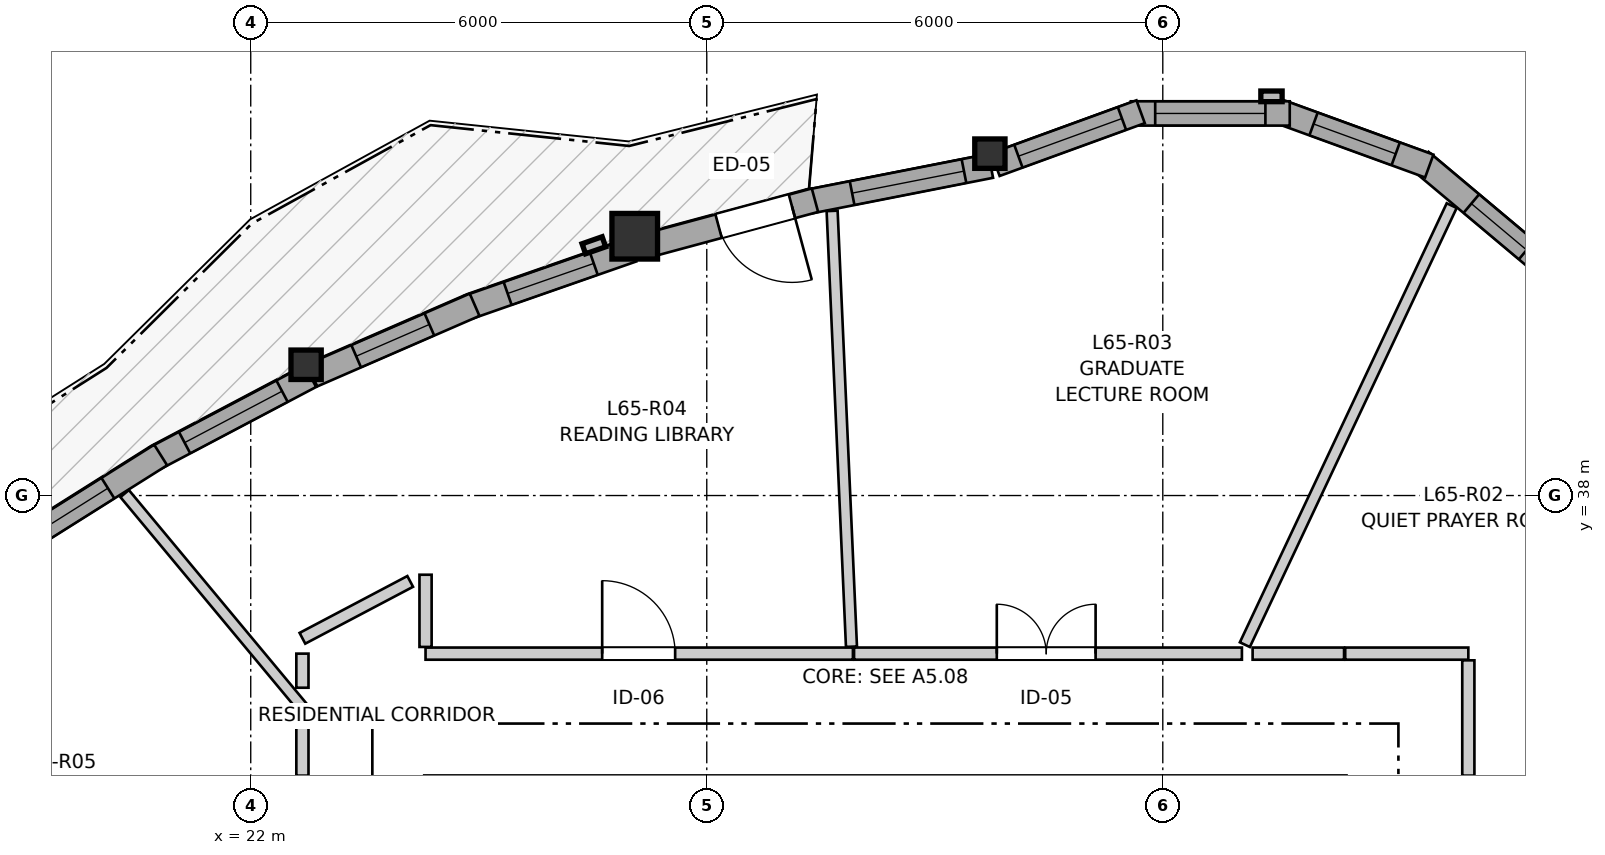
"""IFC4 building model, lengths in metres.
Left out: names, types, materials, properties, quantities, classifications, styles, units other than length and angle.
Written with IfcOpenShell. Run it as: python <this file> out.ifc"""

import sys

from ifc_helpers import new_model, si_unit, direction, frame, frame_2d, origin, origin_2d, place, context, subcontext, project, spatial, rectangle, i_section, extrude, source, transform, mapped, element, fill, save


model = new_model("IFC4")
c1 = context("Model", 3, precision=1e-05, world=origin(), true_north=direction((0.0, 1.0)))
c2 = subcontext(c1, "Body", "Model", "MODEL_VIEW")
j1 = project(units=[si_unit("LENGTHUNIT", "METRE"), si_unit("PLANEANGLEUNIT", "RADIAN")], contexts=[c1])
p1 = place(None, origin())
s1 = spatial("IfcSite", under=j1, at=p1, CompositionType="ELEMENT")
p2 = place(p1, origin())
s2 = spatial("IfcBuilding", under=s1, at=p2, CompositionType="ELEMENT")
p3 = place(p2, frame((0.0, 0.0, 218.0)))
s3 = spatial("IfcBuildingStorey", under=s2, at=p3, CompositionType="ELEMENT", Elevation=218.0)
m1 = source(origin(), c2, "Body", "SweptSolid", [
    extrude(i_section(OverallWidth=0.398, OverallDepth=0.387, WebThickness=0.019, FlangeThickness=0.03, FilletRadius=0.015, at=origin_2d()), origin(), (0.0, 0.0, 1.0), 2.96),
])
p4 = place(p3, frame((31.725, 42.498, 0.0), z_axis=(0.0, 0.0, 1.0), x_axis=(1.0, 0.0, 0.0)))
e1 = element("IfcColumn", 1, at=p4, inside=s3, PredefinedType="PILASTER", context=c2, shape_type="MappedRepresentation", body=[
    mapped(m1, transform((0.0, 0.0, 0.0), x_axis=(1.0, 0.0, 0.0), y_axis=(0.0, 1.0, 0.0), z_axis=(0.0, 0.0, 1.0), scale=1.0)),
])
m2 = source(origin(), c2, "Body", "SweptSolid", [
    extrude(rectangle(XDim=0.6, YDim=0.6, at=origin_2d()), origin(), (0.0, 0.0, 1.0), 2.96),
])
p5 = place(p3, frame((27.052, 41.411, 0.0), z_axis=(0.0, 0.0, 1.0), x_axis=(1.0, 0.0, 0.0)))
e2 = element("IfcColumn", 2, at=p5, inside=s3, PredefinedType="COLUMN", context=c2, shape_type="MappedRepresentation", body=[
    mapped(m2, transform((0.0, 0.0, 0.0), x_axis=(1.0, 0.0, 0.0), y_axis=(0.0, 1.0, 0.0), z_axis=(0.0, 0.0, 1.0), scale=1.0)),
])
p6 = place(p3, frame((22.729, 39.72, 0.0), z_axis=(0.0, 0.0, 1.0), x_axis=(1.0, 0.0, 0.0)))
e3 = element("IfcColumn", 3, at=p6, inside=s3, PredefinedType="PILASTER", context=c2, shape_type="MappedRepresentation", body=[
    mapped(m1, transform((0.0, 0.0, 0.0), x_axis=(1.0, 0.0, 0.0), y_axis=(0.0, 1.0, 0.0), z_axis=(0.0, 0.0, 1.0), scale=1.0)),
])
p7 = place(p3, frame((38.994, 41.056, 0.0), z_axis=(0.0, 0.0, 1.0), x_axis=(-0.766024572719, 0.642811289563, 0.0)))
e4 = element("IfcWall", 4, at=p7, inside=s3, PredefinedType="SOLIDWALL", context=c2, shape_type="SweptSolid", body=[
    extrude(rectangle(XDim=2.09, YDim=0.32, at=frame_2d((1.045, 0.0))), origin(), (0.0, 0.0, 1.0), 2.58),
])
p8 = place(p7, frame((0.271, 0.0, 0.82)))
e5 = element("IfcOpeningElement", 5, at=p8, cuts=e4, PredefinedType="OPENING", context=c2, shape_type="SweptSolid", body=[
    extrude(rectangle(XDim=0.95, YDim=1.35, at=frame_2d((0.475, 0.675))), frame((0.0, 0.17, 0.0), z_axis=(0.0, -1.0, 0.0), x_axis=(1.0, 0.0, 0.0)), (0.0, 0.0, 1.0), 0.34),
])
p9 = place(p3, frame((37.506, 42.334, 0.0), z_axis=(0.0, 0.0, 1.0), x_axis=(-0.939711556618, 0.341968113072, 0.0)))
e6 = element("IfcWall", 6, at=p9, inside=s3, PredefinedType="SOLIDWALL", context=c2, shape_type="SweptSolid", body=[
    extrude(rectangle(XDim=2.09, YDim=0.32, at=frame_2d((1.045, 0.0))), origin(), (0.0, 0.0, 1.0), 2.58),
])
p10 = place(p9, frame((0.47, 0.0, 0.82)))
e7 = element("IfcOpeningElement", 7, at=p10, cuts=e6, PredefinedType="OPENING", context=c2, shape_type="SweptSolid", body=[
    extrude(rectangle(XDim=1.15, YDim=1.2, at=frame_2d((0.575, 0.6))), frame((0.0, 0.17, 0.0), z_axis=(0.0, -1.0, 0.0), x_axis=(1.0, 0.0, 0.0)), (0.0, 0.0, 1.0), 0.34),
])
p11 = place(p3, frame((35.67, 43.027, 0.0), z_axis=(0.0, 0.0, 1.0), x_axis=(-1.0, 0.0, 0.0)))
e8 = element("IfcWall", 8, at=p11, inside=s3, PredefinedType="SOLIDWALL", context=c2, shape_type="SweptSolid", body=[
    extrude(rectangle(XDim=2.09, YDim=0.32, at=frame_2d((1.045, 0.0))), origin(), (0.0, 0.0, 1.0), 2.58),
])
p12 = place(p11, frame((0.32, 0.0, 0.82)))
e9 = element("IfcOpeningElement", 9, at=p12, cuts=e8, PredefinedType="OPENING", context=c2, shape_type="SweptSolid", body=[
    extrude(rectangle(XDim=1.45, YDim=1.25, at=frame_2d((0.725, 0.625))), frame((0.0, 0.17, 0.0), z_axis=(0.0, -1.0, 0.0), x_axis=(1.0, 0.0, 0.0)), (0.0, 0.0, 1.0), 0.34),
])
p13 = place(p3, frame((33.708, 43.049, 0.0), z_axis=(0.0, 0.0, 1.0), x_axis=(-0.939691662178, -0.342022777067, 0.0)))
e10 = element("IfcWall", 10, at=p13, inside=s3, PredefinedType="SOLIDWALL", context=c2, shape_type="SweptSolid", body=[
    extrude(rectangle(XDim=2.032, YDim=0.32, at=frame_2d((1.016, 0.0))), origin(), (0.0, 0.0, 1.0), 2.58),
])
p14 = place(p13, frame((0.261, 0.0, 0.82)))
e11 = element("IfcOpeningElement", 11, at=p14, cuts=e10, PredefinedType="OPENING", context=c2, shape_type="SweptSolid", body=[
    extrude(rectangle(XDim=1.45, YDim=1.25, at=frame_2d((0.725, 0.625))), frame((0.0, 0.17, 0.0), z_axis=(0.0, -1.0, 0.0), x_axis=(1.0, 0.0, 0.0)), (0.0, 0.0, 1.0), 0.34),
])
p15 = place(p3, frame((31.736, 42.337, 0.0), z_axis=(0.0, 0.0, 1.0), x_axis=(-0.981228566979, -0.192848384345, 0.0)))
e12 = element("IfcWall", 12, at=p15, inside=s3, PredefinedType="SOLIDWALL", context=c2, shape_type="SweptSolid", body=[
    extrude(rectangle(XDim=2.443, YDim=0.32, at=frame_2d((1.222, 0.0))), origin(), (0.0, 0.0, 1.0), 2.58),
])
p16 = place(p15, frame((0.359, 0.0, 0.82)))
e13 = element("IfcOpeningElement", 13, at=p16, cuts=e12, PredefinedType="OPENING", context=c2, shape_type="SweptSolid", body=[
    extrude(rectangle(XDim=1.5, YDim=1.45, at=frame_2d((0.75, 0.725))), frame((0.0, 0.17, 0.0), z_axis=(0.0, -1.0, 0.0), x_axis=(1.0, 0.0, 0.0)), (0.0, 0.0, 1.0), 0.34),
])
p17 = place(p3, frame((29.424, 41.885, 0.0), z_axis=(0.0, 0.0, 1.0), x_axis=(-0.965461343217, -0.260546338976, 0.0)))
e14 = element("IfcWall", 14, at=p17, inside=s3, PredefinedType="SOLIDWALL", context=c2, shape_type="SweptSolid", body=[
    extrude(rectangle(XDim=2.323, YDim=0.32, at=frame_2d((1.162, 0.0))), origin(), (0.0, 0.0, 1.0), 2.58),
])
p18 = place(p17, frame((0.313, 0.0, 0.0)))
e15 = element("IfcOpeningElement", 15, at=p18, cuts=e14, PredefinedType="OPENING", context=c2, shape_type="SweptSolid", body=[
    extrude(rectangle(XDim=1.0, YDim=2.1, at=frame_2d((0.5, 1.05))), frame((0.0, 0.17, 0.0), z_axis=(0.0, -1.0, 0.0), x_axis=(1.0, 0.0, 0.0)), (0.0, 0.0, 1.0), 0.34),
])
p19 = place(p3, frame((27.02, 41.23, 0.0), z_axis=(0.0, 0.0, 1.0), x_axis=(-0.944142960918, -0.329536142705, 0.0)))
e16 = element("IfcWall", 16, at=p19, inside=s3, PredefinedType="SOLIDWALL", context=c2, shape_type="SweptSolid", body=[
    extrude(rectangle(XDim=2.284, YDim=0.32, at=frame_2d((1.142, 0.0))), origin(), (0.0, 0.0, 1.0), 2.58),
])
p20 = place(p19, frame((0.537, 0.0, 0.82)))
e17 = element("IfcOpeningElement", 17, at=p20, cuts=e16, PredefinedType="OPENING", context=c2, shape_type="SweptSolid", body=[
    extrude(rectangle(XDim=1.2, YDim=1.45, at=frame_2d((0.6, 0.725))), frame((0.0, 0.17, 0.0), z_axis=(0.0, -1.0, 0.0), x_axis=(1.0, 0.0, 0.0)), (0.0, 0.0, 1.0), 0.34),
])
p21 = place(p3, frame((24.945, 40.51, 0.0), z_axis=(0.0, 0.0, 1.0), x_axis=(-0.917060051629, -0.39874912126, 0.0)))
e18 = element("IfcWall", 18, at=p21, inside=s3, PredefinedType="SOLIDWALL", context=c2, shape_type="SweptSolid", body=[
    extrude(rectangle(XDim=2.328, YDim=0.32, at=frame_2d((1.164, 0.0))), origin(), (0.0, 0.0, 1.0), 2.58),
])
p22 = place(p21, frame((0.649, 0.0, 0.82)))
e19 = element("IfcOpeningElement", 19, at=p22, cuts=e18, PredefinedType="OPENING", context=c2, shape_type="SweptSolid", body=[
    extrude(rectangle(XDim=1.05, YDim=1.45, at=frame_2d((0.525, 0.725))), frame((0.0, 0.17, 0.0), z_axis=(0.0, -1.0, 0.0), x_axis=(1.0, 0.0, 0.0)), (0.0, 0.0, 1.0), 0.34),
])
p23 = place(p3, frame((22.785, 39.57, 0.0), z_axis=(0.0, 0.0, 1.0), x_axis=(-0.884379914657, -0.466767786541, 0.0)))
e20 = element("IfcWall", 20, at=p23, inside=s3, PredefinedType="SOLIDWALL", context=c2, shape_type="SweptSolid", body=[
    extrude(rectangle(XDim=2.314, YDim=0.32, at=frame_2d((1.157, 0.0))), origin(), (0.0, 0.0, 1.0), 2.58),
])
p24 = place(p23, frame((0.422, 0.0, 0.82)))
e21 = element("IfcOpeningElement", 21, at=p24, cuts=e20, PredefinedType="OPENING", context=c2, shape_type="SweptSolid", body=[
    extrude(rectangle(XDim=1.45, YDim=1.25, at=frame_2d((0.725, 0.625))), frame((0.0, 0.17, 0.0), z_axis=(0.0, -1.0, 0.0), x_axis=(1.0, 0.0, 0.0)), (0.0, 0.0, 1.0), 0.34),
])
p25 = place(p3, frame((20.815, 38.533, 0.0), z_axis=(0.0, 0.0, 1.0), x_axis=(-0.846418054627, -0.532518991963, 0.0)))
e22 = element("IfcWall", 22, at=p25, inside=s3, PredefinedType="SOLIDWALL", context=c2, shape_type="SweptSolid", body=[
    extrude(rectangle(XDim=2.245, YDim=0.32, at=frame_2d((1.122, 0.0))), origin(), (0.0, 0.0, 1.0), 2.58),
])
p26 = place(p25, frame((0.82, 0.0, 0.82)))
e23 = element("IfcOpeningElement", 23, at=p26, cuts=e22, PredefinedType="OPENING", context=c2, shape_type="SweptSolid", body=[
    extrude(rectangle(XDim=1.05, YDim=1.45, at=frame_2d((0.525, 0.725))), frame((0.0, 0.17, 0.0), z_axis=(0.0, -1.0, 0.0), x_axis=(1.0, 0.0, 0.0)), (0.0, 0.0, 1.0), 0.34),
])
p27 = place(p3, frame((24.3, 35.92, 0.0), z_axis=(0.0, 0.0, 1.0), x_axis=(1.0, 0.0, 0.0)))
e24 = element("IfcWall", 24, at=p27, inside=s3, PredefinedType="PARTITIONING", context=c2, shape_type="SweptSolid", body=[
    extrude(rectangle(XDim=5.623, YDim=0.16, at=frame_2d((2.812, 0.0))), origin(), (0.0, 0.0, 1.0), 2.96),
])
p28 = place(p27, frame((2.324, 0.0, 0.0)))
e25 = element("IfcOpeningElement", 25, at=p28, cuts=e24, PredefinedType="OPENING", context=c2, shape_type="SweptSolid", body=[
    extrude(rectangle(XDim=0.96, YDim=2.1, at=frame_2d((0.48, 1.05))), frame((0.0, 0.09, 0.0), z_axis=(0.0, -1.0, 0.0), x_axis=(1.0, 0.0, 0.0)), (0.0, 0.0, 1.0), 0.18),
])
p29 = place(p3, frame((29.938, 35.92, 0.0), z_axis=(0.0, 0.0, 1.0), x_axis=(1.0, 0.0, 0.0)))
e26 = element("IfcWall", 26, at=p29, inside=s3, PredefinedType="PARTITIONING", context=c2, shape_type="SweptSolid", body=[
    extrude(rectangle(XDim=5.103, YDim=0.16, at=frame_2d((2.552, 0.0))), origin(), (0.0, 0.0, 1.0), 2.628),
])
p30 = place(p29, frame((1.878, 0.0, 0.0)))
e27 = element("IfcOpeningElement", 27, at=p30, cuts=e26, PredefinedType="OPENING", context=c2, shape_type="SweptSolid", body=[
    extrude(rectangle(XDim=1.3, YDim=2.1, at=frame_2d((0.65, 1.05))), frame((0.0, 0.09, 0.0), z_axis=(0.0, -1.0, 0.0), x_axis=(1.0, 0.0, 0.0)), (0.0, 0.0, 1.0), 0.18),
])
p31 = place(p3, frame((35.08, 36.038, 0.0), z_axis=(0.0, 0.0, 1.0), x_axis=(0.426214985607, 0.904621902258, 0.0)))
e28 = element("IfcWall", 28, at=p31, inside=s3, PredefinedType="PARTITIONING", context=c2, shape_type="SweptSolid", body=[
    extrude(rectangle(XDim=6.385, YDim=0.145, at=frame_2d((3.192, 0.0))), origin(), (0.0, 0.0, 1.0), 2.96),
])
p32 = place(p3, frame((29.649, 41.745, 0.0), z_axis=(0.0, 0.0, 1.0), x_axis=(0.044327022296, -0.999017074476, 0.0)))
e29 = element("IfcWall", 29, at=p32, inside=s3, PredefinedType="PARTITIONING", context=c2, shape_type="SweptSolid", body=[
    extrude(rectangle(XDim=5.739, YDim=0.145, at=frame_2d((2.87, 0.0))), origin(), (0.0, 0.0, 1.0), 2.96),
])
p33 = place(p3, frame((20.341, 38.025, 0.0), z_axis=(0.0, 0.0, 1.0), x_axis=(0.639731122463, -0.768598784121, 0.0)))
e30 = element("IfcWall", 30, at=p33, inside=s3, PredefinedType="PARTITIONING", context=c2, shape_type="SweptSolid", body=[
    extrude(rectangle(XDim=3.656, YDim=0.145, at=frame_2d((1.828, 0.0))), origin(), (0.0, 0.0, 1.0), 2.96),
])
p34 = place(p3, frame((36.4, 35.92, 0.0), z_axis=(0.0, 0.0, 1.0), x_axis=(1.0, 0.0, 0.0)))
e31 = element("IfcWall", 31, at=p34, inside=s3, PredefinedType="PARTITIONING", context=c2, shape_type="SweptSolid", body=[
    extrude(rectangle(XDim=1.62, YDim=0.16, at=frame_2d((0.81, 0.0))), origin(), (0.0, 0.0, 1.0), 2.96),
])
p35 = place(p3, frame((38.02, 34.315, 0.0), z_axis=(0.0, 0.0, 1.0), x_axis=(0.0, 1.0, 0.0)))
e32 = element("IfcWall", 32, at=p35, inside=s3, PredefinedType="PARTITIONING", context=c2, shape_type="SweptSolid", body=[
    extrude(rectangle(XDim=1.517, YDim=0.16, at=frame_2d((0.759, 0.0))), origin(), (0.0, 0.0, 1.0), 2.628),
])
p36 = place(p3, frame((22.68, 36.122, 0.0), z_axis=(0.0, 0.0, 1.0), x_axis=(0.884468554818, 0.466599802335, 0.0)))
e33 = element("IfcWall", 33, at=p36, inside=s3, PredefinedType="PARTITIONING", context=c2, shape_type="SweptSolid", body=[
    extrude(rectangle(XDim=1.603, YDim=0.16, at=frame_2d((0.802, 0.0))), origin(), (0.0, 0.0, 1.0), 2.96),
])
p37 = place(p3, frame((35.182, 35.92, 0.0), z_axis=(0.0, 0.0, 1.0), x_axis=(1.0, 0.0, 0.0)))
e34 = element("IfcWall", 34, at=p37, inside=s3, PredefinedType="PARTITIONING", context=c2, shape_type="SweptSolid", body=[
    extrude(rectangle(XDim=1.203, YDim=0.16, at=frame_2d((0.602, 0.0))), origin(), (0.0, 0.0, 1.0), 2.96),
])
p38 = place(p3, frame((24.3, 36.008, 0.0), z_axis=(0.0, 0.0, 1.0), x_axis=(0.0, 1.0, 0.0)))
e35 = element("IfcWall", 35, at=p38, inside=s3, PredefinedType="PARTITIONING", context=c2, shape_type="SweptSolid", body=[
    extrude(rectangle(XDim=0.95, YDim=0.16, at=frame_2d((0.475, 0.0))), origin(), (0.0, 0.0, 1.0), 2.96),
])
p39 = place(p3, frame((22.68, 34.315, 0.0), z_axis=(0.0, 0.0, 1.0), x_axis=(0.0, 1.0, 0.0)))
e36 = element("IfcWall", 36, at=p39, inside=s3, PredefinedType="PARTITIONING", context=c2, shape_type="SweptSolid", body=[
    extrude(rectangle(XDim=0.707, YDim=0.16, at=frame_2d((0.353, 0.0))), origin(), (0.0, 0.0, 1.0), 2.96),
])
p40 = place(p3, frame((22.68, 35.471, 0.0), z_axis=(0.0, 0.0, 1.0), x_axis=(0.0, 1.0, 0.0)))
e37 = element("IfcWall", 37, at=p40, inside=s3, PredefinedType="PARTITIONING", context=c2, shape_type="SweptSolid", body=[
    extrude(rectangle(XDim=0.448, YDim=0.16, at=frame_2d((0.224, 0.0))), origin(), (0.0, 0.0, 1.0), 2.96),
])
m3 = source(origin(), c2, "Body", "SweptSolid", [
    extrude(rectangle(XDim=0.95, YDim=1.35, at=frame_2d((0.475, 0.675))), frame((0.0, 0.03, 0.0), z_axis=(0.0, -1.0, 0.0), x_axis=(1.0, 0.0, 0.0)), (0.0, 0.0, 1.0), 0.06),
])
p41 = place(p8, origin())
e38 = element("IfcWindow", 38, at=p41, inside=s3, PartitioningType="SINGLE_PANEL", PredefinedType="WINDOW", context=c2, shape_type="MappedRepresentation", body=[
    mapped(m3, transform((0.0, 0.0, 0.0), x_axis=(1.0, 0.0, 0.0), y_axis=(0.0, 1.0, 0.0), z_axis=(0.0, 0.0, 1.0), scale=1.0)),
])
fill(e5, e38)
m4 = source(origin(), c2, "Body", "SweptSolid", [
    extrude(rectangle(XDim=1.15, YDim=1.2, at=frame_2d((0.575, 0.6))), frame((0.0, 0.03, 0.0), z_axis=(0.0, -1.0, 0.0), x_axis=(1.0, 0.0, 0.0)), (0.0, 0.0, 1.0), 0.06),
])
p42 = place(p10, origin())
e39 = element("IfcWindow", 39, at=p42, inside=s3, PartitioningType="SINGLE_PANEL", PredefinedType="WINDOW", context=c2, shape_type="MappedRepresentation", body=[
    mapped(m4, transform((0.0, 0.0, 0.0), x_axis=(1.0, 0.0, 0.0), y_axis=(0.0, 1.0, 0.0), z_axis=(0.0, 0.0, 1.0), scale=1.0)),
])
fill(e7, e39)
m5 = source(origin(), c2, "Body", "SweptSolid", [
    extrude(rectangle(XDim=1.45, YDim=1.25, at=frame_2d((0.725, 0.625))), frame((0.0, 0.03, 0.0), z_axis=(0.0, -1.0, 0.0), x_axis=(1.0, 0.0, 0.0)), (0.0, 0.0, 1.0), 0.06),
])
p43 = place(p12, origin())
e40 = element("IfcWindow", 40, at=p43, inside=s3, PartitioningType="SINGLE_PANEL", PredefinedType="WINDOW", context=c2, shape_type="MappedRepresentation", body=[
    mapped(m5, transform((0.0, 0.0, 0.0), x_axis=(1.0, 0.0, 0.0), y_axis=(0.0, 1.0, 0.0), z_axis=(0.0, 0.0, 1.0), scale=1.0)),
])
fill(e9, e40)
p44 = place(p14, origin())
e41 = element("IfcWindow", 41, at=p44, inside=s3, PartitioningType="SINGLE_PANEL", PredefinedType="WINDOW", context=c2, shape_type="MappedRepresentation", body=[
    mapped(m5, transform((0.0, 0.0, 0.0), x_axis=(1.0, 0.0, 0.0), y_axis=(0.0, 1.0, 0.0), z_axis=(0.0, 0.0, 1.0), scale=1.0)),
])
fill(e11, e41)
m6 = source(origin(), c2, "Body", "SweptSolid", [
    extrude(rectangle(XDim=1.5, YDim=1.45, at=frame_2d((0.75, 0.725))), frame((0.0, 0.03, 0.0), z_axis=(0.0, -1.0, 0.0), x_axis=(1.0, 0.0, 0.0)), (0.0, 0.0, 1.0), 0.06),
])
p45 = place(p16, origin())
e42 = element("IfcWindow", 42, at=p45, inside=s3, PartitioningType="SINGLE_PANEL", PredefinedType="WINDOW", context=c2, shape_type="MappedRepresentation", body=[
    mapped(m6, transform((0.0, 0.0, 0.0), x_axis=(1.0, 0.0, 0.0), y_axis=(0.0, 1.0, 0.0), z_axis=(0.0, 0.0, 1.0), scale=1.0)),
])
fill(e13, e42)
m7 = source(origin(), c2, "Body", "SweptSolid", [
    extrude(rectangle(XDim=1.2, YDim=1.45, at=frame_2d((0.6, 0.725))), frame((0.0, 0.03, 0.0), z_axis=(0.0, -1.0, 0.0), x_axis=(1.0, 0.0, 0.0)), (0.0, 0.0, 1.0), 0.06),
])
p46 = place(p20, origin())
e43 = element("IfcWindow", 43, at=p46, inside=s3, PartitioningType="SINGLE_PANEL", PredefinedType="WINDOW", context=c2, shape_type="MappedRepresentation", body=[
    mapped(m7, transform((0.0, 0.0, 0.0), x_axis=(1.0, 0.0, 0.0), y_axis=(0.0, 1.0, 0.0), z_axis=(0.0, 0.0, 1.0), scale=1.0)),
])
fill(e17, e43)
m8 = source(origin(), c2, "Body", "SweptSolid", [
    extrude(rectangle(XDim=1.05, YDim=1.45, at=frame_2d((0.525, 0.725))), frame((0.0, 0.03, 0.0), z_axis=(0.0, -1.0, 0.0), x_axis=(1.0, 0.0, 0.0)), (0.0, 0.0, 1.0), 0.06),
])
p47 = place(p22, origin())
e44 = element("IfcWindow", 44, at=p47, inside=s3, PartitioningType="SINGLE_PANEL", PredefinedType="WINDOW", context=c2, shape_type="MappedRepresentation", body=[
    mapped(m8, transform((0.0, 0.0, 0.0), x_axis=(1.0, 0.0, 0.0), y_axis=(0.0, 1.0, 0.0), z_axis=(0.0, 0.0, 1.0), scale=1.0)),
])
fill(e19, e44)
p48 = place(p24, origin())
e45 = element("IfcWindow", 45, at=p48, inside=s3, PartitioningType="SINGLE_PANEL", PredefinedType="WINDOW", context=c2, shape_type="MappedRepresentation", body=[
    mapped(m5, transform((0.0, 0.0, 0.0), x_axis=(1.0, 0.0, 0.0), y_axis=(0.0, 1.0, 0.0), z_axis=(0.0, 0.0, 1.0), scale=1.0)),
])
fill(e21, e45)
p49 = place(p26, origin())
e46 = element("IfcWindow", 46, at=p49, inside=s3, PartitioningType="SINGLE_PANEL", PredefinedType="WINDOW", context=c2, shape_type="MappedRepresentation", body=[
    mapped(m8, transform((0.0, 0.0, 0.0), x_axis=(1.0, 0.0, 0.0), y_axis=(0.0, 1.0, 0.0), z_axis=(0.0, 0.0, 1.0), scale=1.0)),
])
fill(e23, e46)
m9 = source(origin(), c2, "Body", "SweptSolid", [
    extrude(rectangle(XDim=1.0, YDim=2.1, at=frame_2d((0.5, 1.05))), frame((0.0, 0.025, 0.0), z_axis=(0.0, -1.0, 0.0), x_axis=(1.0, 0.0, 0.0)), (0.0, 0.0, 1.0), 0.05),
])
p50 = place(p18, origin())
e47 = element("IfcDoor", 47, at=p50, inside=s3, OperationType="SINGLE_SWING_LEFT", PredefinedType="DOOR", context=c2, shape_type="MappedRepresentation", body=[
    mapped(m9, transform((0.0, 0.0, 0.0), x_axis=(1.0, 0.0, 0.0), y_axis=(0.0, 1.0, 0.0), z_axis=(0.0, 0.0, 1.0), scale=1.0)),
])
fill(e15, e47)
m10 = source(origin(), c2, "Body", "SweptSolid", [
    extrude(rectangle(XDim=0.96, YDim=2.1, at=frame_2d((0.48, 1.05))), frame((0.0, 0.025, 0.0), z_axis=(0.0, -1.0, 0.0), x_axis=(1.0, 0.0, 0.0)), (0.0, 0.0, 1.0), 0.05),
])
p51 = place(p28, origin())
e48 = element("IfcDoor", 48, at=p51, inside=s3, OperationType="SINGLE_SWING_LEFT", PredefinedType="DOOR", context=c2, shape_type="MappedRepresentation", body=[
    mapped(m10, transform((0.0, 0.0, 0.0), x_axis=(1.0, 0.0, 0.0), y_axis=(0.0, 1.0, 0.0), z_axis=(0.0, 0.0, 1.0), scale=1.0)),
])
fill(e25, e48)
m11 = source(origin(), c2, "Body", "SweptSolid", [
    extrude(rectangle(XDim=1.3, YDim=2.1, at=frame_2d((0.65, 1.05))), frame((0.0, 0.025, 0.0), z_axis=(0.0, -1.0, 0.0), x_axis=(1.0, 0.0, 0.0)), (0.0, 0.0, 1.0), 0.05),
])
p52 = place(p30, origin())
e49 = element("IfcDoor", 49, at=p52, inside=s3, OperationType="DOUBLE_DOOR_SINGLE_SWING", PredefinedType="DOOR", context=c2, shape_type="MappedRepresentation", body=[
    mapped(m11, transform((0.0, 0.0, 0.0), x_axis=(1.0, 0.0, 0.0), y_axis=(0.0, 1.0, 0.0), z_axis=(0.0, 0.0, 1.0), scale=1.0)),
])
fill(e27, e49)
save(model, sys.argv[1])
